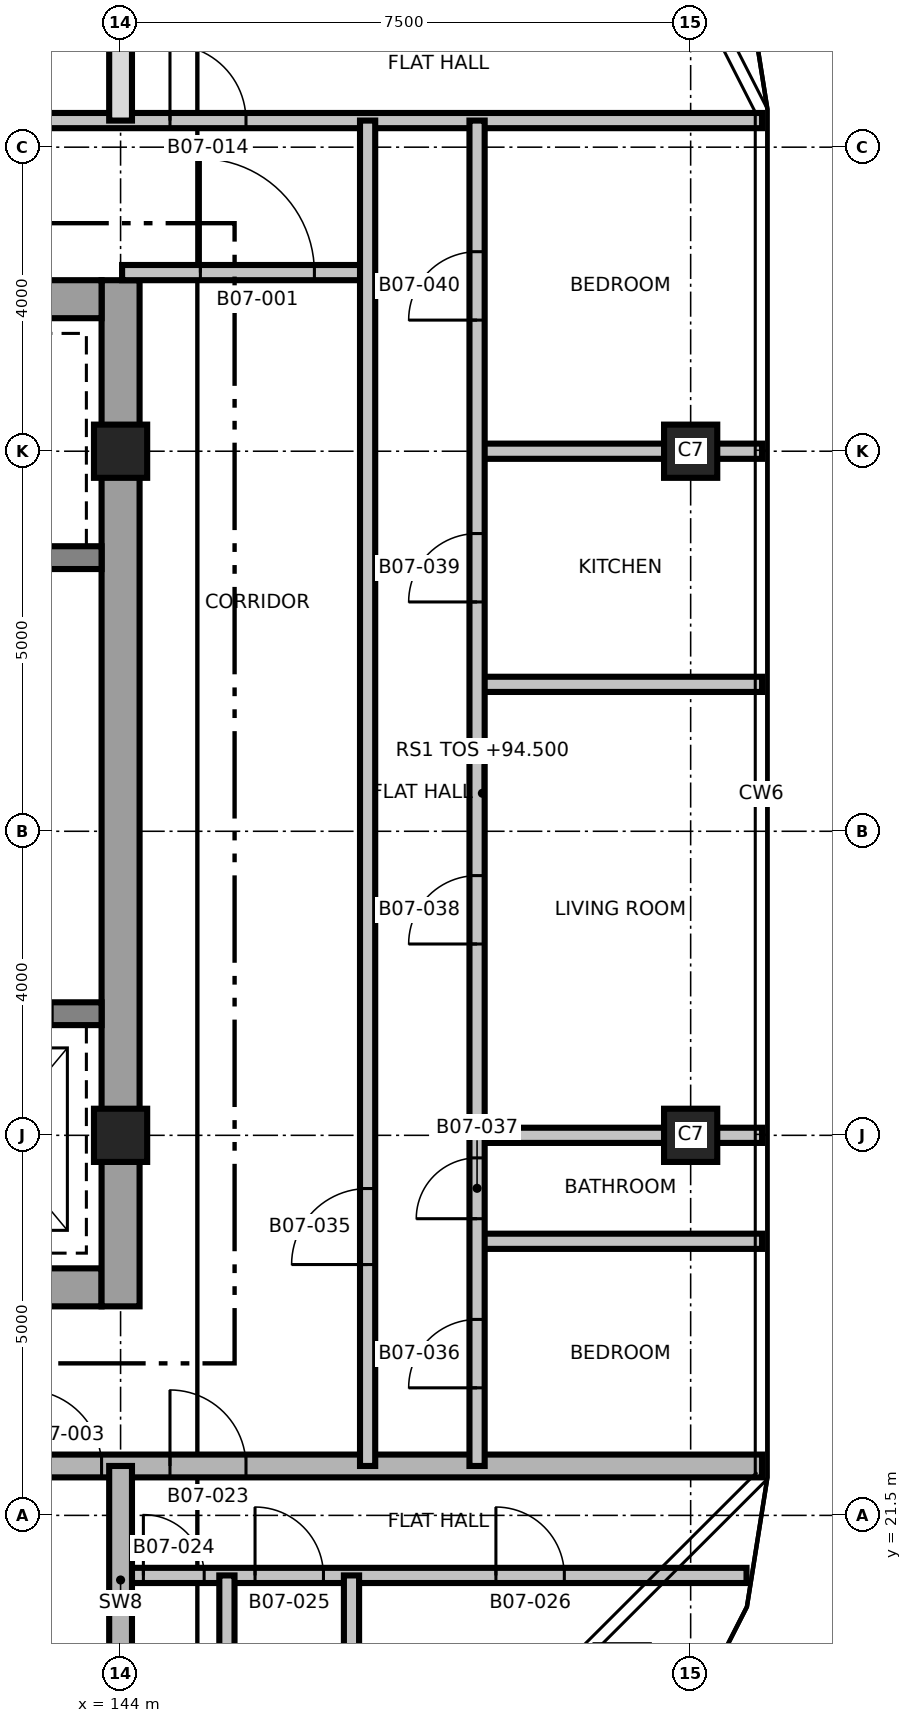
"""IFC4 building model, lengths in metres.
Left out: names, types, materials, properties, quantities, classifications, styles, units other than length and angle.
Written with IfcOpenShell. Run it as: python <this file> out.ifc"""

import sys

from ifc_helpers import new_model, si_unit, direction, frame, frame_2d, origin, origin_2d, place, context, subcontext, project, spatial, rectangle, extrude, element, fill, save


model = new_model("IFC4")
c1 = context("Model", 3, precision=1e-05, world=origin(), true_north=direction((0.0, 1.0)))
c2 = subcontext(c1, "Body", "Model", "MODEL_VIEW")
j1 = project(units=[si_unit("LENGTHUNIT", "METRE"), si_unit("PLANEANGLEUNIT", "RADIAN")], contexts=[c1])
p1 = place(None, origin())
s1 = spatial("IfcSite", under=j1, at=p1, CompositionType="ELEMENT")
p2 = place(p1, origin())
s2 = spatial("IfcBuilding", under=s1, at=p2, CompositionType="ELEMENT")
p3 = place(p2, frame((0.0, 0.0, 90.8)))
s3 = spatial("IfcBuildingStorey", under=s2, at=p3, CompositionType="ELEMENT", Elevation=90.8)
p4 = place(p3, frame((128.75, 24.5, 0.0), z_axis=(0.0, 0.0, 1.0), x_axis=(1.0, 0.0, 0.0)))
e1 = element("IfcWall", 1, at=p4, inside=s3, PredefinedType="SHEAR", context=c2, shape_type="SweptSolid", body=[
    extrude(rectangle(XDim=15.0, YDim=0.5, at=frame_2d((7.5, 0.0))), origin(), (0.0, 0.0, 1.0), 3.7),
])
p5 = place(p4, frame((9.65, 0.0, 0.0)))
e2 = element("IfcOpeningElement", 2, at=p5, cuts=e1, PredefinedType="OPENING", context=c2, shape_type="SweptSolid", body=[
    extrude(rectangle(XDim=1.5, YDim=2.1, at=frame_2d((0.75, 1.05))), frame((0.0, 0.26, 0.0), z_axis=(0.0, -1.0, 0.0), x_axis=(1.0, 0.0, 0.0)), (0.0, 0.0, 1.0), 0.52),
])
p6 = place(p4, frame((1.25, 0.0, 0.0)))
e3 = element("IfcOpeningElement", 3, at=p6, cuts=e1, PredefinedType="OPENING", context=c2, shape_type="SweptSolid", body=[
    extrude(rectangle(XDim=0.9, YDim=2.1, at=frame_2d((0.45, 1.05))), frame((0.0, 0.26, 0.0), z_axis=(0.0, -1.0, 0.0), x_axis=(1.0, 0.0, 0.0)), (0.0, 0.0, 1.0), 0.52),
])
p7 = place(p3, frame((144.0, 24.25, 0.0), z_axis=(0.0, 0.0, 1.0), x_axis=(0.0, 1.0, 0.0)))
e4 = element("IfcWall", 4, at=p7, inside=s3, PredefinedType="SHEAR", context=c2, shape_type="SweptSolid", body=[
    extrude(rectangle(XDim=13.5, YDim=0.5, at=frame_2d((6.75, 0.0))), origin(), (0.0, 0.0, 1.0), 3.7),
])
p8 = place(p3, frame((128.75, 37.5, 0.0), z_axis=(0.0, 0.0, 1.0), x_axis=(1.0, 0.0, 0.0)))
e5 = element("IfcWall", 5, at=p8, inside=s3, PredefinedType="SHEAR", context=c2, shape_type="SweptSolid", body=[
    extrude(rectangle(XDim=15.0, YDim=0.5, at=frame_2d((7.5, 0.0))), origin(), (0.0, 0.0, 1.0), 3.7),
])
p9 = place(p8, frame((9.65, 0.0, 0.0)))
e6 = element("IfcOpeningElement", 6, at=p9, cuts=e5, PredefinedType="OPENING", context=c2, shape_type="SweptSolid", body=[
    extrude(rectangle(XDim=1.5, YDim=2.1, at=frame_2d((0.75, 1.05))), frame((0.0, 0.26, 0.0), z_axis=(0.0, -1.0, 0.0), x_axis=(1.0, 0.0, 0.0)), (0.0, 0.0, 1.0), 0.52),
])
p10 = place(p8, frame((12.85, 0.0, 0.0)))
e7 = element("IfcOpeningElement", 7, at=p10, cuts=e5, PredefinedType="OPENING", context=c2, shape_type="SweptSolid", body=[
    extrude(rectangle(XDim=0.9, YDim=2.1, at=frame_2d((0.45, 1.05))), frame((0.0, 0.26, 0.0), z_axis=(0.0, -1.0, 0.0), x_axis=(1.0, 0.0, 0.0)), (0.0, 0.0, 1.0), 0.52),
])
p11 = place(p8, frame((3.8, 0.0, 0.0)))
e8 = element("IfcOpeningElement", 8, at=p11, cuts=e5, PredefinedType="OPENING", context=c2, shape_type="SweptSolid", body=[
    extrude(rectangle(XDim=0.9, YDim=2.1, at=frame_2d((0.45, 1.05))), frame((0.0, 0.26, 0.0), z_axis=(0.0, -1.0, 0.0), x_axis=(1.0, 0.0, 0.0)), (0.0, 0.0, 1.0), 0.52),
])
p12 = place(p8, frame((6.7, 0.0, 0.0)))
e9 = element("IfcOpeningElement", 9, at=p12, cuts=e5, PredefinedType="OPENING", context=c2, shape_type="SweptSolid", body=[
    extrude(rectangle(XDim=0.9, YDim=2.1, at=frame_2d((0.45, 1.05))), frame((0.0, 0.26, 0.0), z_axis=(0.0, -1.0, 0.0), x_axis=(1.0, 0.0, 0.0)), (0.0, 0.0, 1.0), 0.52),
])
p13 = place(p3, frame((141.05, 28.1, 0.0), z_axis=(0.0, 0.0, 1.0), x_axis=(1.0, 0.0, 0.0)))
e10 = element("IfcWall", 10, at=p13, inside=s3, PredefinedType="SHEAR", context=c2, shape_type="SweptSolid", body=[
    extrude(rectangle(XDim=2.7, YDim=0.3, at=frame_2d((1.35, 0.0))), origin(), (0.0, 0.0, 1.0), 3.7),
])
p14 = place(p13, frame((0.75, 0.0, 0.0)))
e11 = element("IfcOpeningElement", 11, at=p14, cuts=e10, PredefinedType="OPENING", context=c2, shape_type="SweptSolid", body=[
    extrude(rectangle(XDim=1.3, YDim=2.4, at=frame_2d((0.65, 1.2))), frame((0.0, 0.16, 0.0), z_axis=(0.0, -1.0, 0.0), x_axis=(1.0, 0.0, 0.0)), (0.0, 0.0, 1.0), 0.32),
])
p15 = place(p3, frame((141.05, 34.1, 0.0), z_axis=(0.0, 0.0, 1.0), x_axis=(1.0, 0.0, 0.0)))
e12 = element("IfcWall", 12, at=p15, inside=s3, PredefinedType="SHEAR", context=c2, shape_type="SweptSolid", body=[
    extrude(rectangle(XDim=2.7, YDim=0.3, at=frame_2d((1.35, 0.0))), origin(), (0.0, 0.0, 1.0), 3.7),
])
for number, where, z_axis, x_axis in (
    (13, (144.0, 26.5, 0.0), (0.0, 0.0, 1.0), (1.0, 0.0, 0.0)),
    (14, (151.5, 26.5, 0.0), (0.0, 0.0, 1.0), (1.0, 0.0, 0.0)),
    (15, (144.0, 35.5, 0.0), (0.0, 0.0, 1.0), (1.0, 0.0, 0.0)),
    (16, (151.5, 35.5, 0.0), (0.0, 0.0, 1.0), (1.0, 0.0, 0.0)),
):
    element("IfcColumn", number, at=place(p3, frame(where, z_axis=z_axis, x_axis=x_axis)), inside=s3, PredefinedType="COLUMN", context=c2, shape_type="SweptSolid", body=[
        extrude(rectangle(XDim=0.7, YDim=0.7, at=origin_2d()), origin(), (0.0, 0.0, 1.0), 3.7),
    ])
p16 = place(p3, frame((144.0, 20.71, 0.0), z_axis=(0.0, 0.0, 1.0), x_axis=(1.0, 0.0, 0.0)))
e17 = element("IfcWall", 17, at=p16, inside=s3, PredefinedType="PARTITIONING", context=c2, shape_type="SweptSolid", body=[
    extrude(rectangle(XDim=8.235, YDim=0.2, at=frame_2d((4.118, 0.0))), origin(), (0.0, 0.0, 1.0), 3.4),
])
p17 = place(p16, frame((0.3, 0.0, 0.0)))
e18 = element("IfcOpeningElement", 18, at=p17, cuts=e17, PredefinedType="OPENING", context=c2, shape_type="SweptSolid", body=[
    extrude(rectangle(XDim=0.8, YDim=2.1, at=frame_2d((0.4, 1.05))), frame((0.0, 0.11, 0.0), z_axis=(0.0, -1.0, 0.0), x_axis=(1.0, 0.0, 0.0)), (0.0, 0.0, 1.0), 0.22),
])
p18 = place(p16, frame((1.769, 0.0, 0.0)))
e19 = element("IfcOpeningElement", 19, at=p18, cuts=e17, PredefinedType="OPENING", context=c2, shape_type="SweptSolid", body=[
    extrude(rectangle(XDim=0.9, YDim=2.1, at=frame_2d((0.45, 1.05))), frame((0.0, 0.11, 0.0), z_axis=(0.0, -1.0, 0.0), x_axis=(1.0, 0.0, 0.0)), (0.0, 0.0, 1.0), 0.22),
])
p19 = place(p16, frame((4.938, 0.0, 0.0)))
e20 = element("IfcOpeningElement", 20, at=p19, cuts=e17, PredefinedType="OPENING", context=c2, shape_type="SweptSolid", body=[
    extrude(rectangle(XDim=0.9, YDim=2.1, at=frame_2d((0.45, 1.05))), frame((0.0, 0.11, 0.0), z_axis=(0.0, -1.0, 0.0), x_axis=(1.0, 0.0, 0.0)), (0.0, 0.0, 1.0), 0.22),
])
p20 = place(p3, frame((120.56, 22.15, 0.0), z_axis=(0.0, 0.0, 1.0), x_axis=(1.0, 0.0, 0.0)))
e21 = element("IfcWall", 21, at=p20, inside=s3, PredefinedType="SHEAR", context=c2, shape_type="SweptSolid", body=[
    extrude(rectangle(XDim=31.88, YDim=0.3, at=frame_2d((15.94, 0.0))), origin(), (0.0, 0.0, 1.0), 3.4),
])
p21 = place(p20, frame((22.19, 0.0, 0.0)))
e22 = element("IfcOpeningElement", 22, at=p21, cuts=e21, PredefinedType="OPENING", context=c2, shape_type="SweptSolid", body=[
    extrude(rectangle(XDim=1.0, YDim=2.1, at=frame_2d((0.5, 1.05))), frame((0.0, 0.16, 0.0), z_axis=(0.0, -1.0, 0.0), x_axis=(1.0, 0.0, 0.0)), (0.0, 0.0, 1.0), 0.32),
])
p22 = place(p20, frame((10.54, 0.0, 0.0)))
e23 = element("IfcOpeningElement", 23, at=p22, cuts=e21, PredefinedType="OPENING", context=c2, shape_type="SweptSolid", body=[
    extrude(rectangle(XDim=1.0, YDim=2.1, at=frame_2d((0.5, 1.05))), frame((0.0, 0.16, 0.0), z_axis=(0.0, -1.0, 0.0), x_axis=(1.0, 0.0, 0.0)), (0.0, 0.0, 1.0), 0.32),
])
p23 = place(p20, frame((24.09, 0.0, 0.0)))
e24 = element("IfcOpeningElement", 24, at=p23, cuts=e21, PredefinedType="OPENING", context=c2, shape_type="SweptSolid", body=[
    extrude(rectangle(XDim=1.0, YDim=2.1, at=frame_2d((0.5, 1.05))), frame((0.0, 0.16, 0.0), z_axis=(0.0, -1.0, 0.0), x_axis=(1.0, 0.0, 0.0)), (0.0, 0.0, 1.0), 0.32),
])
p24 = place(p20, frame((16.19, 0.0, 0.0)))
e25 = element("IfcOpeningElement", 25, at=p24, cuts=e21, PredefinedType="OPENING", context=c2, shape_type="SweptSolid", body=[
    extrude(rectangle(XDim=0.9, YDim=2.1, at=frame_2d((0.45, 1.05))), frame((0.0, 0.16, 0.0), z_axis=(0.0, -1.0, 0.0), x_axis=(1.0, 0.0, 0.0)), (0.0, 0.0, 1.0), 0.32),
])
for number, where, z_axis, x_axis in (
    (26, (148.69, 25.106, 0.0), (0.0, 0.0, 1.0), (1.0, 0.0, 0.0)),
    (27, (148.69, 26.5, 0.0), (0.0, 0.0, 1.0), (1.0, 0.0, 0.0)),
    (28, (148.69, 32.433, 0.0), (0.0, 0.0, 1.0), (1.0, 0.0, 0.0)),
    (29, (148.69, 35.5, 0.0), (0.0, 0.0, 1.0), (1.0, 0.0, 0.0)),
):
    element("IfcWall", number, at=place(p3, frame(where, z_axis=z_axis, x_axis=x_axis)), inside=s3, PredefinedType="PARTITIONING", context=c2, shape_type="SweptSolid", body=[
        extrude(rectangle(XDim=3.75, YDim=0.2, at=frame_2d((1.875, 0.0))), origin(), (0.0, 0.0, 1.0), 3.4),
    ])
p25 = place(p3, frame((144.02, 37.85, 0.0), z_axis=(0.0, 0.0, 1.0), x_axis=(1.0, 0.0, 0.0)))
e30 = element("IfcWall", 30, at=p25, inside=s3, PredefinedType="PARTITIONING", context=c2, shape_type="SweptSolid", body=[
    extrude(rectangle(XDim=3.23, YDim=0.2, at=frame_2d((1.615, 0.0))), origin(), (0.0, 0.0, 1.0), 3.4),
])
p26 = place(p25, frame((1.03, 0.0, 0.0)))
e31 = element("IfcOpeningElement", 31, at=p26, cuts=e30, PredefinedType="OPENING", context=c2, shape_type="SweptSolid", body=[
    extrude(rectangle(XDim=1.5, YDim=2.1, at=frame_2d((0.75, 1.05))), frame((0.0, 0.11, 0.0), z_axis=(0.0, -1.0, 0.0), x_axis=(1.0, 0.0, 0.0)), (0.0, 0.0, 1.0), 0.22),
])
p27 = place(p3, frame((120.56, 39.85, 0.0), z_axis=(0.0, 0.0, 1.0), x_axis=(1.0, 0.0, 0.0)))
e32 = element("IfcWall", 32, at=p27, inside=s3, PredefinedType="PARTITIONING", context=c2, shape_type="SweptSolid", body=[
    extrude(rectangle(XDim=31.88, YDim=0.2, at=frame_2d((15.94, 0.0))), origin(), (0.0, 0.0, 1.0), 3.4),
])
p28 = place(p27, frame((6.79, 0.0, 0.0)))
e33 = element("IfcOpeningElement", 33, at=p28, cuts=e32, PredefinedType="OPENING", context=c2, shape_type="SweptSolid", body=[
    extrude(rectangle(XDim=1.0, YDim=2.1, at=frame_2d((0.5, 1.05))), frame((0.0, 0.11, 0.0), z_axis=(0.0, -1.0, 0.0), x_axis=(1.0, 0.0, 0.0)), (0.0, 0.0, 1.0), 0.22),
])
p29 = place(p27, frame((15.44, 0.0, 0.0)))
e34 = element("IfcOpeningElement", 34, at=p29, cuts=e32, PredefinedType="OPENING", context=c2, shape_type="SweptSolid", body=[
    extrude(rectangle(XDim=1.0, YDim=2.1, at=frame_2d((0.5, 1.05))), frame((0.0, 0.11, 0.0), z_axis=(0.0, -1.0, 0.0), x_axis=(1.0, 0.0, 0.0)), (0.0, 0.0, 1.0), 0.22),
])
p30 = place(p27, frame((24.09, 0.0, 0.0)))
e35 = element("IfcOpeningElement", 35, at=p30, cuts=e32, PredefinedType="OPENING", context=c2, shape_type="SweptSolid", body=[
    extrude(rectangle(XDim=1.0, YDim=2.1, at=frame_2d((0.5, 1.05))), frame((0.0, 0.11, 0.0), z_axis=(0.0, -1.0, 0.0), x_axis=(1.0, 0.0, 0.0)), (0.0, 0.0, 1.0), 0.22),
])
p31 = place(p3, frame((144.0, 19.15, 0.0), z_axis=(0.0, 0.0, 1.0), x_axis=(0.0, 1.0, 0.0)))
e36 = element("IfcWall", 36, at=p31, inside=s3, PredefinedType="SHEAR", context=c2, shape_type="SweptSolid", body=[
    extrude(rectangle(XDim=3.0, YDim=0.3, at=frame_2d((1.5, 0.0))), origin(), (0.0, 0.0, 1.0), 3.4),
])
p32 = place(p3, frame((144.0, 39.85, 0.0), z_axis=(0.0, 0.0, 1.0), x_axis=(0.0, 1.0, 0.0)))
e37 = element("IfcWall", 37, at=p32, inside=s3, PredefinedType="PARTITIONING", context=c2, shape_type="SweptSolid", body=[
    extrude(rectangle(XDim=2.987, YDim=0.3, at=frame_2d((1.493, 0.0))), origin(), (0.0, 0.0, 1.0), 3.4),
])
p33 = place(p3, frame((145.399, 16.56, 0.0), z_axis=(0.0, 0.0, 1.0), x_axis=(0.0, 1.0, 0.0)))
e38 = element("IfcWall", 38, at=p33, inside=s3, PredefinedType="PARTITIONING", context=c2, shape_type="SweptSolid", body=[
    extrude(rectangle(XDim=4.15, YDim=0.2, at=frame_2d((2.075, 0.0))), origin(), (0.0, 0.0, 1.0), 3.4),
])
p34 = place(p3, frame((147.038, 16.567, 0.0), z_axis=(0.0, 0.0, 1.0), x_axis=(0.0, 1.0, 0.0)))
e39 = element("IfcWall", 39, at=p34, inside=s3, PredefinedType="PARTITIONING", context=c2, shape_type="SweptSolid", body=[
    extrude(rectangle(XDim=4.143, YDim=0.2, at=frame_2d((2.072, 0.0))), origin(), (0.0, 0.0, 1.0), 3.4),
])
p35 = place(p3, frame((147.25, 22.15, 0.0), z_axis=(0.0, 0.0, 1.0), x_axis=(0.0, 1.0, 0.0)))
e40 = element("IfcWall", 40, at=p35, inside=s3, PredefinedType="PARTITIONING", context=c2, shape_type="SweptSolid", body=[
    extrude(rectangle(XDim=17.7, YDim=0.2, at=frame_2d((8.85, 0.0))), origin(), (0.0, 0.0, 1.0), 3.4),
])
p36 = place(p35, frame((2.65, 0.0, 0.0)))
e41 = element("IfcOpeningElement", 41, at=p36, cuts=e40, PredefinedType="OPENING", context=c2, shape_type="SweptSolid", body=[
    extrude(rectangle(XDim=1.0, YDim=2.1, at=frame_2d((0.5, 1.05))), frame((0.0, 0.11, 0.0), z_axis=(0.0, -1.0, 0.0), x_axis=(1.0, 0.0, 0.0)), (0.0, 0.0, 1.0), 0.22),
])
p37 = place(p3, frame((148.69, 22.15, 0.0), z_axis=(0.0, 0.0, 1.0), x_axis=(0.0, 1.0, 0.0)))
e42 = element("IfcWall", 42, at=p37, inside=s3, PredefinedType="PARTITIONING", context=c2, shape_type="SweptSolid", body=[
    extrude(rectangle(XDim=17.7, YDim=0.2, at=frame_2d((8.85, 0.0))), origin(), (0.0, 0.0, 1.0), 3.4),
])
p38 = place(p37, frame((1.028, 0.0, 0.0)))
e43 = element("IfcOpeningElement", 43, at=p38, cuts=e42, PredefinedType="OPENING", context=c2, shape_type="SweptSolid", body=[
    extrude(rectangle(XDim=0.9, YDim=2.1, at=frame_2d((0.45, 1.05))), frame((0.0, 0.11, 0.0), z_axis=(0.0, -1.0, 0.0), x_axis=(1.0, 0.0, 0.0)), (0.0, 0.0, 1.0), 0.22),
])
p39 = place(p37, frame((3.253, 0.0, 0.0)))
e44 = element("IfcOpeningElement", 44, at=p39, cuts=e42, PredefinedType="OPENING", context=c2, shape_type="SweptSolid", body=[
    extrude(rectangle(XDim=0.8, YDim=2.1, at=frame_2d((0.4, 1.05))), frame((0.0, 0.11, 0.0), z_axis=(0.0, -1.0, 0.0), x_axis=(1.0, 0.0, 0.0)), (0.0, 0.0, 1.0), 0.22),
])
p40 = place(p37, frame((6.867, 0.0, 0.0)))
e45 = element("IfcOpeningElement", 45, at=p40, cuts=e42, PredefinedType="OPENING", context=c2, shape_type="SweptSolid", body=[
    extrude(rectangle(XDim=0.9, YDim=2.1, at=frame_2d((0.45, 1.05))), frame((0.0, 0.11, 0.0), z_axis=(0.0, -1.0, 0.0), x_axis=(1.0, 0.0, 0.0)), (0.0, 0.0, 1.0), 0.22),
])
p41 = place(p37, frame((11.367, 0.0, 0.0)))
e46 = element("IfcOpeningElement", 46, at=p41, cuts=e42, PredefinedType="OPENING", context=c2, shape_type="SweptSolid", body=[
    extrude(rectangle(XDim=0.9, YDim=2.1, at=frame_2d((0.45, 1.05))), frame((0.0, 0.11, 0.0), z_axis=(0.0, -1.0, 0.0), x_axis=(1.0, 0.0, 0.0)), (0.0, 0.0, 1.0), 0.22),
])
p42 = place(p37, frame((15.075, 0.0, 0.0)))
e47 = element("IfcOpeningElement", 47, at=p42, cuts=e42, PredefinedType="OPENING", context=c2, shape_type="SweptSolid", body=[
    extrude(rectangle(XDim=0.9, YDim=2.1, at=frame_2d((0.45, 1.05))), frame((0.0, 0.11, 0.0), z_axis=(0.0, -1.0, 0.0), x_axis=(1.0, 0.0, 0.0)), (0.0, 0.0, 1.0), 0.22),
])
p43 = place(p26, origin())
e48 = element("IfcDoor", 48, at=p43, inside=s3, OperationType="SINGLE_SWING_LEFT", PredefinedType="DOOR", context=c2, shape_type="SweptSolid", body=[
    extrude(rectangle(XDim=1.5, YDim=2.1, at=frame_2d((0.75, 1.05))), frame((0.0, 0.025, 0.0), z_axis=(0.0, -1.0, 0.0), x_axis=(1.0, 0.0, 0.0)), (0.0, 0.0, 1.0), 0.05),
])
fill(e31, e48)
p44 = place(p21, origin())
e49 = element("IfcDoor", 49, at=p44, inside=s3, OperationType="SINGLE_SWING_LEFT", PredefinedType="DOOR", context=c2, shape_type="SweptSolid", body=[
    extrude(rectangle(XDim=1.0, YDim=2.1, at=frame_2d((0.5, 1.05))), frame((0.0, 0.025, 0.0), z_axis=(0.0, -1.0, 0.0), x_axis=(1.0, 0.0, 0.0)), (0.0, 0.0, 1.0), 0.05),
])
fill(e22, e49)
p45 = place(p30, origin())
e50 = element("IfcDoor", 50, at=p45, inside=s3, OperationType="SINGLE_SWING_RIGHT", PredefinedType="DOOR", context=c2, shape_type="SweptSolid", body=[
    extrude(rectangle(XDim=1.0, YDim=2.1, at=frame_2d((0.5, 1.05))), frame((0.0, 0.025, 0.0), z_axis=(0.0, -1.0, 0.0), x_axis=(1.0, 0.0, 0.0)), (0.0, 0.0, 1.0), 0.05),
])
fill(e35, e50)
p46 = place(p23, origin())
e51 = element("IfcDoor", 51, at=p46, inside=s3, OperationType="SINGLE_SWING_LEFT", PredefinedType="DOOR", context=c2, shape_type="SweptSolid", body=[
    extrude(rectangle(XDim=1.0, YDim=2.1, at=frame_2d((0.5, 1.05))), frame((0.0, 0.025, 0.0), z_axis=(0.0, -1.0, 0.0), x_axis=(1.0, 0.0, 0.0)), (0.0, 0.0, 1.0), 0.05),
])
fill(e24, e51)
p47 = place(p17, origin())
e52 = element("IfcDoor", 52, at=p47, inside=s3, OperationType="SINGLE_SWING_RIGHT", PredefinedType="DOOR", context=c2, shape_type="SweptSolid", body=[
    extrude(rectangle(XDim=0.8, YDim=2.1, at=frame_2d((0.4, 1.05))), frame((0.0, 0.025, 0.0), z_axis=(0.0, -1.0, 0.0), x_axis=(1.0, 0.0, 0.0)), (0.0, 0.0, 1.0), 0.05),
])
fill(e18, e52)
p48 = place(p18, origin())
e53 = element("IfcDoor", 53, at=p48, inside=s3, OperationType="SINGLE_SWING_LEFT", PredefinedType="DOOR", context=c2, shape_type="SweptSolid", body=[
    extrude(rectangle(XDim=0.9, YDim=2.1, at=frame_2d((0.45, 1.05))), frame((0.0, 0.025, 0.0), z_axis=(0.0, -1.0, 0.0), x_axis=(1.0, 0.0, 0.0)), (0.0, 0.0, 1.0), 0.05),
])
fill(e19, e53)
p49 = place(p19, origin())
e54 = element("IfcDoor", 54, at=p49, inside=s3, OperationType="SINGLE_SWING_RIGHT", PredefinedType="DOOR", context=c2, shape_type="SweptSolid", body=[
    extrude(rectangle(XDim=0.9, YDim=2.1, at=frame_2d((0.45, 1.05))), frame((0.0, 0.025, 0.0), z_axis=(0.0, -1.0, 0.0), x_axis=(1.0, 0.0, 0.0)), (0.0, 0.0, 1.0), 0.05),
])
fill(e20, e54)
p50 = place(p36, origin())
e55 = element("IfcDoor", 55, at=p50, inside=s3, OperationType="SINGLE_SWING_LEFT", PredefinedType="DOOR", context=c2, shape_type="SweptSolid", body=[
    extrude(rectangle(XDim=1.0, YDim=2.1, at=frame_2d((0.5, 1.05))), frame((0.0, 0.025, 0.0), z_axis=(0.0, -1.0, 0.0), x_axis=(1.0, 0.0, 0.0)), (0.0, 0.0, 1.0), 0.05),
])
fill(e41, e55)
p51 = place(p38, origin())
e56 = element("IfcDoor", 56, at=p51, inside=s3, OperationType="SINGLE_SWING_RIGHT", PredefinedType="DOOR", context=c2, shape_type="SweptSolid", body=[
    extrude(rectangle(XDim=0.9, YDim=2.1, at=frame_2d((0.45, 1.05))), frame((0.0, 0.025, 0.0), z_axis=(0.0, -1.0, 0.0), x_axis=(1.0, 0.0, 0.0)), (0.0, 0.0, 1.0), 0.05),
])
fill(e43, e56)
p52 = place(p39, origin())
e57 = element("IfcDoor", 57, at=p52, inside=s3, OperationType="SINGLE_SWING_LEFT", PredefinedType="DOOR", context=c2, shape_type="SweptSolid", body=[
    extrude(rectangle(XDim=0.8, YDim=2.1, at=frame_2d((0.4, 1.05))), frame((0.0, 0.025, 0.0), z_axis=(0.0, -1.0, 0.0), x_axis=(1.0, 0.0, 0.0)), (0.0, 0.0, 1.0), 0.05),
])
fill(e44, e57)
p53 = place(p40, origin())
e58 = element("IfcDoor", 58, at=p53, inside=s3, OperationType="SINGLE_SWING_RIGHT", PredefinedType="DOOR", context=c2, shape_type="SweptSolid", body=[
    extrude(rectangle(XDim=0.9, YDim=2.1, at=frame_2d((0.45, 1.05))), frame((0.0, 0.025, 0.0), z_axis=(0.0, -1.0, 0.0), x_axis=(1.0, 0.0, 0.0)), (0.0, 0.0, 1.0), 0.05),
])
fill(e45, e58)
p54 = place(p41, origin())
e59 = element("IfcDoor", 59, at=p54, inside=s3, OperationType="SINGLE_SWING_LEFT", PredefinedType="DOOR", context=c2, shape_type="SweptSolid", body=[
    extrude(rectangle(XDim=0.9, YDim=2.1, at=frame_2d((0.45, 1.05))), frame((0.0, 0.025, 0.0), z_axis=(0.0, -1.0, 0.0), x_axis=(1.0, 0.0, 0.0)), (0.0, 0.0, 1.0), 0.05),
])
fill(e46, e59)
p55 = place(p42, origin())
e60 = element("IfcDoor", 60, at=p55, inside=s3, OperationType="SINGLE_SWING_RIGHT", PredefinedType="DOOR", context=c2, shape_type="SweptSolid", body=[
    extrude(rectangle(XDim=0.9, YDim=2.1, at=frame_2d((0.45, 1.05))), frame((0.0, 0.025, 0.0), z_axis=(0.0, -1.0, 0.0), x_axis=(1.0, 0.0, 0.0)), (0.0, 0.0, 1.0), 0.05),
])
fill(e47, e60)
save(model, sys.argv[1])
